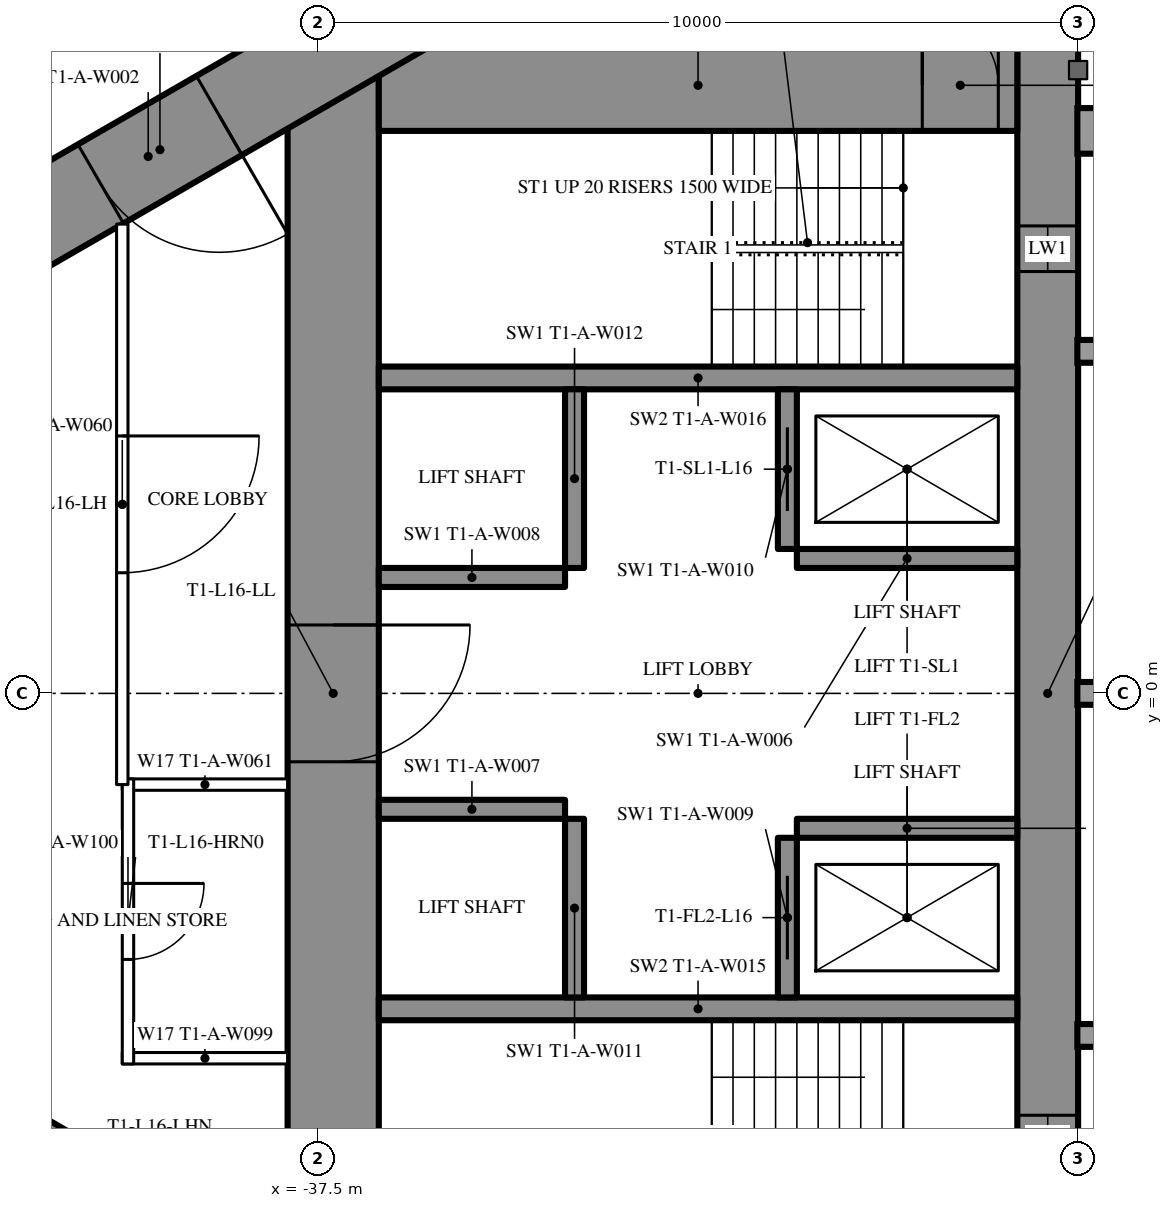
"""IFC4 building model, lengths in metres.
Left out: names, types, materials, properties, quantities, classifications, styles, units other than length and angle.
Written with IfcOpenShell. Run it as: python <this file> out.ifc"""

import sys

from ifc_helpers import new_model, si_unit, direction, frame, frame_2d, origin, place, context, subcontext, project, spatial, rectangle, extrude, element, fill, save


model = new_model("IFC4")
c1 = context("Model", 3, precision=1e-05, world=origin(), true_north=direction((0.0, 1.0)))
c2 = subcontext(c1, "Body", "Model", "MODEL_VIEW")
j1 = project(units=[si_unit("LENGTHUNIT", "METRE"), si_unit("PLANEANGLEUNIT", "RADIAN")], contexts=[c1])
p1 = place(None, origin())
s1 = spatial("IfcSite", under=j1, at=p1, CompositionType="ELEMENT")
p2 = place(p1, origin())
s2 = spatial("IfcBuilding", under=s1, at=p2, CompositionType="ELEMENT")
p3 = place(p2, frame((0.0, 0.0, 63.5)))
s3 = spatial("IfcBuildingStorey", under=s2, at=p3, CompositionType="ELEMENT", Elevation=63.5)
p4 = place(p3, frame((-27.9, 8.6, 0.0), z_axis=(0.0, 0.0, 1.0), x_axis=(0.0, -1.0, 0.0)))
e1 = element("IfcWall", 1, at=p4, inside=s3, PredefinedType="SHEAR", context=c2, shape_type="SweptSolid", body=[
    extrude(rectangle(XDim=17.2, YDim=0.8, at=frame_2d((8.6, 0.0))), origin(), (0.0, 0.0, 1.0), 3.5),
])
p5 = place(p4, frame((2.45, 0.0, 0.6)))
e2 = element("IfcOpeningElement", 2, at=p5, cuts=e1, PredefinedType="OPENING", context=c2, shape_type="SweptSolid", body=[
    extrude(rectangle(XDim=0.6, YDim=2.1, at=frame_2d((0.3, 1.05))), frame((0.0, 0.41, 0.0), z_axis=(0.0, -1.0, 0.0), x_axis=(1.0, 0.0, 0.0)), (0.0, 0.0, 1.0), 0.82),
])
p6 = place(p4, frame((14.15, 0.0, 0.6)))
e3 = element("IfcOpeningElement", 3, at=p6, cuts=e1, PredefinedType="OPENING", context=c2, shape_type="SweptSolid", body=[
    extrude(rectangle(XDim=0.6, YDim=2.1, at=frame_2d((0.3, 1.05))), frame((0.0, 0.41, 0.0), z_axis=(0.0, -1.0, 0.0), x_axis=(1.0, 0.0, 0.0)), (0.0, 0.0, 1.0), 0.82),
])
p7 = place(p3, frame((-37.3, 8.6, 0.0), z_axis=(0.0, 0.0, 1.0), x_axis=(0.0, -1.0, 0.0)))
e4 = element("IfcWall", 4, at=p7, inside=s3, PredefinedType="SHEAR", context=c2, shape_type="SweptSolid", body=[
    extrude(rectangle(XDim=17.2, YDim=1.2, at=frame_2d((8.6, 0.0))), origin(), (0.0, 0.0, 1.0), 3.5),
])
p8 = place(p7, frame((7.7, 0.0, 0.0)))
e5 = element("IfcOpeningElement", 5, at=p8, cuts=e4, PredefinedType="OPENING", context=c2, shape_type="SweptSolid", body=[
    extrude(rectangle(XDim=1.8, YDim=2.2, at=frame_2d((0.9, 1.1))), frame((0.0, 0.61, 0.0), z_axis=(0.0, -1.0, 0.0), x_axis=(1.0, 0.0, 0.0)), (0.0, 0.0, 1.0), 1.22),
])
p9 = place(p3, frame((-28.3, 8.0, 0.0), z_axis=(0.0, 0.0, 1.0), x_axis=(-1.0, 0.0, 0.0)))
e6 = element("IfcWall", 6, at=p9, inside=s3, PredefinedType="SHEAR", context=c2, shape_type="SweptSolid", body=[
    extrude(rectangle(XDim=8.4, YDim=1.2, at=frame_2d((4.2, 0.0))), origin(), (0.0, 0.0, 1.0), 3.5),
])
p10 = place(p9, frame((0.25, 0.0, 0.0)))
e7 = element("IfcOpeningElement", 7, at=p10, cuts=e6, PredefinedType="OPENING", context=c2, shape_type="SweptSolid", body=[
    extrude(rectangle(XDim=1.0, YDim=2.2, at=frame_2d((0.5, 1.1))), frame((0.0, 0.61, 0.0), z_axis=(0.0, -1.0, 0.0), x_axis=(1.0, 0.0, 0.0)), (0.0, 0.0, 1.0), 1.22),
])
for number, where, z_axis, x_axis in (
    (8, (-28.3, 4.15, 0.0), (0.0, 0.0, 1.0), (-1.0, 0.0, 0.0)),
    (9, (-28.3, -4.15, 0.0), (0.0, 0.0, 1.0), (-1.0, 0.0, 0.0)),
):
    element("IfcWall", number, at=place(p3, frame(where, z_axis=z_axis, x_axis=x_axis)), inside=s3, PredefinedType="SHEAR", context=c2, shape_type="SweptSolid", body=[
        extrude(rectangle(XDim=8.4, YDim=0.3, at=frame_2d((4.2, 0.0))), origin(), (0.0, 0.0, 1.0), 3.5),
    ])
p11 = place(p3, frame((-31.325, 4.0, 0.0), z_axis=(0.0, 0.0, 1.0), x_axis=(0.0, -1.0, 0.0)))
e10 = element("IfcWall", 10, at=p11, inside=s3, PredefinedType="SHEAR", context=c2, shape_type="SweptSolid", body=[
    extrude(rectangle(XDim=2.1, YDim=0.25, at=frame_2d((1.05, 0.0))), origin(), (0.0, 0.0, 1.0), 3.5),
])
p12 = place(p11, frame((0.5, 0.0, 0.0)))
e11 = element("IfcOpeningElement", 11, at=p12, cuts=e10, PredefinedType="OPENING", context=c2, shape_type="SweptSolid", body=[
    extrude(rectangle(XDim=1.1, YDim=2.2, at=frame_2d((0.55, 1.1))), frame((0.0, 0.135, 0.0), z_axis=(0.0, -1.0, 0.0), x_axis=(1.0, 0.0, 0.0)), (0.0, 0.0, 1.0), 0.27),
])
p13 = place(p3, frame((-34.125, 4.0, 0.0), z_axis=(0.0, 0.0, 1.0), x_axis=(0.0, -1.0, 0.0)))
e12 = element("IfcWall", 12, at=p13, inside=s3, PredefinedType="SHEAR", context=c2, shape_type="SweptSolid", body=[
    extrude(rectangle(XDim=2.35, YDim=0.25, at=frame_2d((1.175, 0.0))), origin(), (0.0, 0.0, 1.0), 3.5),
])
p14 = place(p3, frame((-28.3, 1.775, 0.0), z_axis=(0.0, 0.0, 1.0), x_axis=(-1.0, 0.0, 0.0)))
e13 = element("IfcWall", 13, at=p14, inside=s3, PredefinedType="SHEAR", context=c2, shape_type="SweptSolid", body=[
    extrude(rectangle(XDim=2.9, YDim=0.25, at=frame_2d((1.45, 0.0))), origin(), (0.0, 0.0, 1.0), 3.5),
])
p15 = place(p3, frame((-34.25, 1.525, 0.0), z_axis=(0.0, 0.0, 1.0), x_axis=(-1.0, 0.0, 0.0)))
e14 = element("IfcWall", 14, at=p15, inside=s3, PredefinedType="SHEAR", context=c2, shape_type="SweptSolid", body=[
    extrude(rectangle(XDim=2.45, YDim=0.25, at=frame_2d((1.225, 0.0))), origin(), (0.0, 0.0, 1.0), 3.5),
])
p16 = place(p3, frame((-31.325, -1.9, 0.0), z_axis=(0.0, 0.0, 1.0), x_axis=(0.0, -1.0, 0.0)))
e15 = element("IfcWall", 15, at=p16, inside=s3, PredefinedType="SHEAR", context=c2, shape_type="SweptSolid", body=[
    extrude(rectangle(XDim=2.1, YDim=0.25, at=frame_2d((1.05, 0.0))), origin(), (0.0, 0.0, 1.0), 3.5),
])
p17 = place(p16, frame((0.5, 0.0, 0.0)))
e16 = element("IfcOpeningElement", 16, at=p17, cuts=e15, PredefinedType="OPENING", context=c2, shape_type="SweptSolid", body=[
    extrude(rectangle(XDim=1.1, YDim=2.2, at=frame_2d((0.55, 1.1))), frame((0.0, 0.135, 0.0), z_axis=(0.0, -1.0, 0.0), x_axis=(1.0, 0.0, 0.0)), (0.0, 0.0, 1.0), 0.27),
])
p18 = place(p3, frame((-34.125, -1.65, 0.0), z_axis=(0.0, 0.0, 1.0), x_axis=(0.0, -1.0, 0.0)))
e17 = element("IfcWall", 17, at=p18, inside=s3, PredefinedType="SHEAR", context=c2, shape_type="SweptSolid", body=[
    extrude(rectangle(XDim=2.35, YDim=0.25, at=frame_2d((1.175, 0.0))), origin(), (0.0, 0.0, 1.0), 3.5),
])
p19 = place(p3, frame((-28.3, -1.775, 0.0), z_axis=(0.0, 0.0, 1.0), x_axis=(-1.0, 0.0, 0.0)))
e18 = element("IfcWall", 18, at=p19, inside=s3, PredefinedType="SHEAR", context=c2, shape_type="SweptSolid", body=[
    extrude(rectangle(XDim=2.9, YDim=0.25, at=frame_2d((1.45, 0.0))), origin(), (0.0, 0.0, 1.0), 3.5),
])
p20 = place(p3, frame((-34.25, -1.525, 0.0), z_axis=(0.0, 0.0, 1.0), x_axis=(-1.0, 0.0, 0.0)))
e19 = element("IfcWall", 19, at=p20, inside=s3, PredefinedType="SHEAR", context=c2, shape_type="SweptSolid", body=[
    extrude(rectangle(XDim=2.45, YDim=0.25, at=frame_2d((1.225, 0.0))), origin(), (0.0, 0.0, 1.0), 3.5),
])
p21 = place(p3, frame((-27.2, 14.3, 0.0), z_axis=(0.0, 0.0, 1.0), x_axis=(-0.866026593062, -0.499997940104, 0.0)))
e20 = element("IfcWall", 20, at=p21, inside=s3, PredefinedType="SHEAR", context=c2, shape_type="SweptSolid", body=[
    extrude(rectangle(XDim=28.946, YDim=1.2, at=frame_2d((14.473, 0.0))), origin(), (0.0, 0.0, 1.0), 3.5),
])
p22 = place(p21, frame((4.6, 0.0, 0.0)))
e21 = element("IfcOpeningElement", 21, at=p22, cuts=e20, PredefinedType="OPENING", context=c2, shape_type="SweptSolid", body=[
    extrude(rectangle(XDim=1.0, YDim=2.2, at=frame_2d((0.5, 1.1))), frame((0.0, 0.61, 0.0), z_axis=(0.0, -1.0, 0.0), x_axis=(1.0, 0.0, 0.0)), (0.0, 0.0, 1.0), 1.22),
])
p23 = place(p21, frame((13.395, 0.0, 0.0)))
e22 = element("IfcOpeningElement", 22, at=p23, cuts=e20, PredefinedType="OPENING", context=c2, shape_type="SweptSolid", body=[
    extrude(rectangle(XDim=1.8, YDim=2.2, at=frame_2d((0.9, 1.1))), frame((0.0, 0.61, 0.0), z_axis=(0.0, -1.0, 0.0), x_axis=(1.0, 0.0, 0.0)), (0.0, 0.0, 1.0), 1.22),
])
p24 = place(p3, frame((-27.2, -14.3, 0.0), z_axis=(0.0, 0.0, 1.0), x_axis=(-0.866024021859, 0.500002393557, 0.0)))
e23 = element("IfcWall", 23, at=p24, inside=s3, PredefinedType="SHEAR", context=c2, shape_type="SweptSolid", body=[
    extrude(rectangle(XDim=27.907, YDim=1.2, at=frame_2d((13.954, 0.0))), origin(), (0.0, 0.0, 1.0), 3.5),
])
p25 = place(p24, frame((4.6, 0.0, 0.0)))
e24 = element("IfcOpeningElement", 24, at=p25, cuts=e23, PredefinedType="OPENING", context=c2, shape_type="SweptSolid", body=[
    extrude(rectangle(XDim=1.0, YDim=2.2, at=frame_2d((0.5, 1.1))), frame((0.0, 0.61, 0.0), z_axis=(0.0, -1.0, 0.0), x_axis=(1.0, 0.0, 0.0)), (0.0, 0.0, 1.0), 1.22),
])
p26 = place(p24, frame((13.395, 0.0, 0.0)))
e25 = element("IfcOpeningElement", 25, at=p26, cuts=e23, PredefinedType="OPENING", context=c2, shape_type="SweptSolid", body=[
    extrude(rectangle(XDim=1.8, YDim=2.2, at=frame_2d((0.9, 1.1))), frame((0.0, 0.61, 0.0), z_axis=(0.0, -1.0, 0.0), x_axis=(1.0, 0.0, 0.0)), (0.0, 0.0, 1.0), 1.22),
])
p27 = place(p3, frame((-37.7, 10.894, 0.0), z_axis=(0.0, 0.0, 1.0), x_axis=(-0.866027905338, -0.499995667157, 0.0)))
e26 = element("IfcWall", 26, at=p27, inside=s3, PredefinedType="PARTITIONING", context=c2, shape_type="SweptSolid", body=[
    extrude(rectangle(XDim=21.787, YDim=0.2, at=frame_2d((10.894, 0.0))), origin(), (0.0, 0.0, 1.0), 3.25),
])
p28 = place(p27, frame((14.13, 0.0, 0.0)))
e27 = element("IfcOpeningElement", 27, at=p28, cuts=e26, PredefinedType="OPENING", context=c2, shape_type="SweptSolid", body=[
    extrude(rectangle(XDim=0.95, YDim=2.2, at=frame_2d((0.475, 1.1))), frame((0.0, 0.11, 0.0), z_axis=(0.0, -1.0, 0.0), x_axis=(1.0, 0.0, 0.0)), (0.0, 0.0, 1.0), 0.22),
])
p29 = place(p27, frame((20.058, 0.0, 0.0)))
e28 = element("IfcOpeningElement", 28, at=p29, cuts=e26, PredefinedType="OPENING", context=c2, shape_type="SweptSolid", body=[
    extrude(rectangle(XDim=0.95, YDim=2.2, at=frame_2d((0.475, 1.1))), frame((0.0, 0.11, 0.0), z_axis=(0.0, -1.0, 0.0), x_axis=(1.0, 0.0, 0.0)), (0.0, 0.0, 1.0), 0.22),
])
p30 = place(p27, frame((0.6, 0.0, 0.0)))
e29 = element("IfcOpeningElement", 29, at=p30, cuts=e26, PredefinedType="OPENING", context=c2, shape_type="SweptSolid", body=[
    extrude(rectangle(XDim=0.95, YDim=2.2, at=frame_2d((0.475, 1.1))), frame((0.0, 0.11, 0.0), z_axis=(0.0, -1.0, 0.0), x_axis=(1.0, 0.0, 0.0)), (0.0, 0.0, 1.0), 0.22),
])
p31 = place(p3, frame((-36.92, -11.344, 0.0), z_axis=(0.0, 0.0, 1.0), x_axis=(-0.866028313256, 0.499994960614, 0.0)))
e30 = element("IfcWall", 30, at=p31, inside=s3, PredefinedType="PARTITIONING", context=c2, shape_type="SweptSolid", body=[
    extrude(rectangle(XDim=22.568, YDim=0.2, at=frame_2d((11.284, 0.0))), origin(), (0.0, 0.0, 1.0), 3.25),
])
p32 = place(p31, frame((18.668, 0.0, 0.0)))
e31 = element("IfcOpeningElement", 31, at=p32, cuts=e30, PredefinedType="OPENING", context=c2, shape_type="SweptSolid", body=[
    extrude(rectangle(XDim=0.95, YDim=2.2, at=frame_2d((0.475, 1.1))), frame((0.0, 0.11, 0.0), z_axis=(0.0, -1.0, 0.0), x_axis=(1.0, 0.0, 0.0)), (0.0, 0.0, 1.0), 0.22),
])
p33 = place(p31, frame((3.35, 0.0, 0.0)))
e32 = element("IfcOpeningElement", 32, at=p33, cuts=e30, PredefinedType="OPENING", context=c2, shape_type="SweptSolid", body=[
    extrude(rectangle(XDim=1.0, YDim=2.2, at=frame_2d((0.5, 1.1))), frame((0.0, 0.11, 0.0), z_axis=(0.0, -1.0, 0.0), x_axis=(1.0, 0.0, 0.0)), (0.0, 0.0, 1.0), 0.22),
])
for number, where, z_axis, x_axis in (
    (33, (-37.9, -1.2, 0.0), (0.0, 0.0, 1.0), (-1.0, 0.0, 0.0)),
    (34, (-37.9, -4.8, 0.0), (0.0, 0.0, 1.0), (-1.0, 0.0, 0.0)),
):
    element("IfcWall", number, at=place(p3, frame(where, z_axis=z_axis, x_axis=x_axis)), inside=s3, PredefinedType="PARTITIONING", context=c2, shape_type="SweptSolid", body=[
        extrude(rectangle(XDim=2.175, YDim=0.15, at=frame_2d((1.087, 0.0))), origin(), (0.0, 0.0, 1.0), 3.25),
    ])
p34 = place(p3, frame((-40.0, -1.125, 0.0), z_axis=(0.0, 0.0, 1.0), x_axis=(0.0, -1.0, 0.0)))
e35 = element("IfcWall", 35, at=p34, inside=s3, PredefinedType="PARTITIONING", context=c2, shape_type="SweptSolid", body=[
    extrude(rectangle(XDim=3.75, YDim=0.15, at=frame_2d((1.875, 0.0))), origin(), (0.0, 0.0, 1.0), 3.25),
])
p35 = place(p34, frame((1.375, 0.0, 0.0)))
e36 = element("IfcOpeningElement", 36, at=p35, cuts=e35, PredefinedType="OPENING", context=c2, shape_type="SweptSolid", body=[
    extrude(rectangle(XDim=1.0, YDim=2.2, at=frame_2d((0.5, 1.1))), frame((0.0, 0.085, 0.0), z_axis=(0.0, -1.0, 0.0), x_axis=(1.0, 0.0, 0.0)), (0.0, 0.0, 1.0), 0.17),
])
p36 = place(p3, frame((-40.075, 6.174, 0.0), z_axis=(0.0, 0.0, 1.0), x_axis=(0.0, -1.0, 0.0)))
e37 = element("IfcWall", 37, at=p36, inside=s3, PredefinedType="PARTITIONING", context=c2, shape_type="SweptSolid", body=[
    extrude(rectangle(XDim=7.374, YDim=0.15, at=frame_2d((3.687, 0.0))), origin(), (0.0, 0.0, 1.0), 3.25),
])
p37 = place(p36, frame((2.787, 0.0, 0.0)))
e38 = element("IfcOpeningElement", 38, at=p37, cuts=e37, PredefinedType="OPENING", context=c2, shape_type="SweptSolid", body=[
    extrude(rectangle(XDim=1.8, YDim=2.2, at=frame_2d((0.9, 1.1))), frame((0.0, 0.085, 0.0), z_axis=(0.0, -1.0, 0.0), x_axis=(1.0, 0.0, 0.0)), (0.0, 0.0, 1.0), 0.17),
])
p38 = place(p35, origin())
e39 = element("IfcDoor", 39, at=p38, inside=s3, OperationType="SINGLE_SWING_LEFT", PredefinedType="DOOR", context=c2, shape_type="SweptSolid", body=[
    extrude(rectangle(XDim=1.0, YDim=2.2, at=frame_2d((0.5, 1.1))), frame((0.0, 0.025, 0.0), z_axis=(0.0, -1.0, 0.0), x_axis=(1.0, 0.0, 0.0)), (0.0, 0.0, 1.0), 0.05),
])
fill(e36, e39)
p39 = place(p37, origin())
e40 = element("IfcDoor", 40, at=p39, inside=s3, OperationType="DOUBLE_DOOR_SINGLE_SWING", PredefinedType="DOOR", context=c2, shape_type="SweptSolid", body=[
    extrude(rectangle(XDim=1.8, YDim=2.2, at=frame_2d((0.9, 1.1))), frame((0.0, 0.025, 0.0), z_axis=(0.0, -1.0, 0.0), x_axis=(1.0, 0.0, 0.0)), (0.0, 0.0, 1.0), 0.05),
])
fill(e38, e40)
p40 = place(p23, origin())
e41 = element("IfcDoor", 41, at=p40, inside=s3, OperationType="DOUBLE_DOOR_SINGLE_SWING", PredefinedType="DOOR", context=c2, shape_type="SweptSolid", body=[
    extrude(rectangle(XDim=1.8, YDim=2.2, at=frame_2d((0.9, 1.1))), frame((0.0, 0.025, 0.0), z_axis=(0.0, -1.0, 0.0), x_axis=(1.0, 0.0, 0.0)), (0.0, 0.0, 1.0), 0.05),
])
fill(e22, e41)
p41 = place(p8, origin())
e42 = element("IfcDoor", 42, at=p41, inside=s3, OperationType="DOUBLE_DOOR_SINGLE_SWING", PredefinedType="DOOR", context=c2, shape_type="SweptSolid", body=[
    extrude(rectangle(XDim=1.8, YDim=2.2, at=frame_2d((0.9, 1.1))), frame((0.0, 0.025, 0.0), z_axis=(0.0, -1.0, 0.0), x_axis=(1.0, 0.0, 0.0)), (0.0, 0.0, 1.0), 0.05),
])
fill(e5, e42)
p42 = place(p10, origin())
e43 = element("IfcDoor", 43, at=p42, inside=s3, OperationType="SINGLE_SWING_RIGHT", PredefinedType="DOOR", context=c2, shape_type="SweptSolid", body=[
    extrude(rectangle(XDim=1.0, YDim=2.2, at=frame_2d((0.5, 1.1))), frame((0.0, 0.025, 0.0), z_axis=(0.0, -1.0, 0.0), x_axis=(1.0, 0.0, 0.0)), (0.0, 0.0, 1.0), 0.05),
])
fill(e7, e43)
p43 = place(p12, origin())
e44 = element("IfcDoor", 44, at=p43, inside=s3, OperationType="SLIDING_TO_LEFT", PredefinedType="USERDEFINED", context=c2, shape_type="SweptSolid", body=[
    extrude(rectangle(XDim=1.1, YDim=2.2, at=frame_2d((0.55, 1.1))), frame((0.0, 0.025, 0.0), z_axis=(0.0, -1.0, 0.0), x_axis=(1.0, 0.0, 0.0)), (0.0, 0.0, 1.0), 0.05),
])
fill(e11, e44)
p44 = place(p17, origin())
e45 = element("IfcDoor", 45, at=p44, inside=s3, OperationType="SLIDING_TO_LEFT", PredefinedType="USERDEFINED", context=c2, shape_type="SweptSolid", body=[
    extrude(rectangle(XDim=1.1, YDim=2.2, at=frame_2d((0.55, 1.1))), frame((0.0, 0.025, 0.0), z_axis=(0.0, -1.0, 0.0), x_axis=(1.0, 0.0, 0.0)), (0.0, 0.0, 1.0), 0.05),
])
fill(e16, e45)
p45 = place(p5, origin())
e46 = element("IfcWindow", 46, at=p45, inside=s3, PartitioningType="SINGLE_PANEL", PredefinedType="WINDOW", context=c2, shape_type="SweptSolid", body=[
    extrude(rectangle(XDim=0.6, YDim=2.1, at=frame_2d((0.3, 1.05))), frame((0.0, 0.03, 0.0), z_axis=(0.0, -1.0, 0.0), x_axis=(1.0, 0.0, 0.0)), (0.0, 0.0, 1.0), 0.06),
])
fill(e2, e46)
p46 = place(p6, origin())
e47 = element("IfcWindow", 47, at=p46, inside=s3, PartitioningType="SINGLE_PANEL", PredefinedType="WINDOW", context=c2, shape_type="SweptSolid", body=[
    extrude(rectangle(XDim=0.6, YDim=2.1, at=frame_2d((0.3, 1.05))), frame((0.0, 0.03, 0.0), z_axis=(0.0, -1.0, 0.0), x_axis=(1.0, 0.0, 0.0)), (0.0, 0.0, 1.0), 0.06),
])
fill(e3, e47)
save(model, sys.argv[1])
